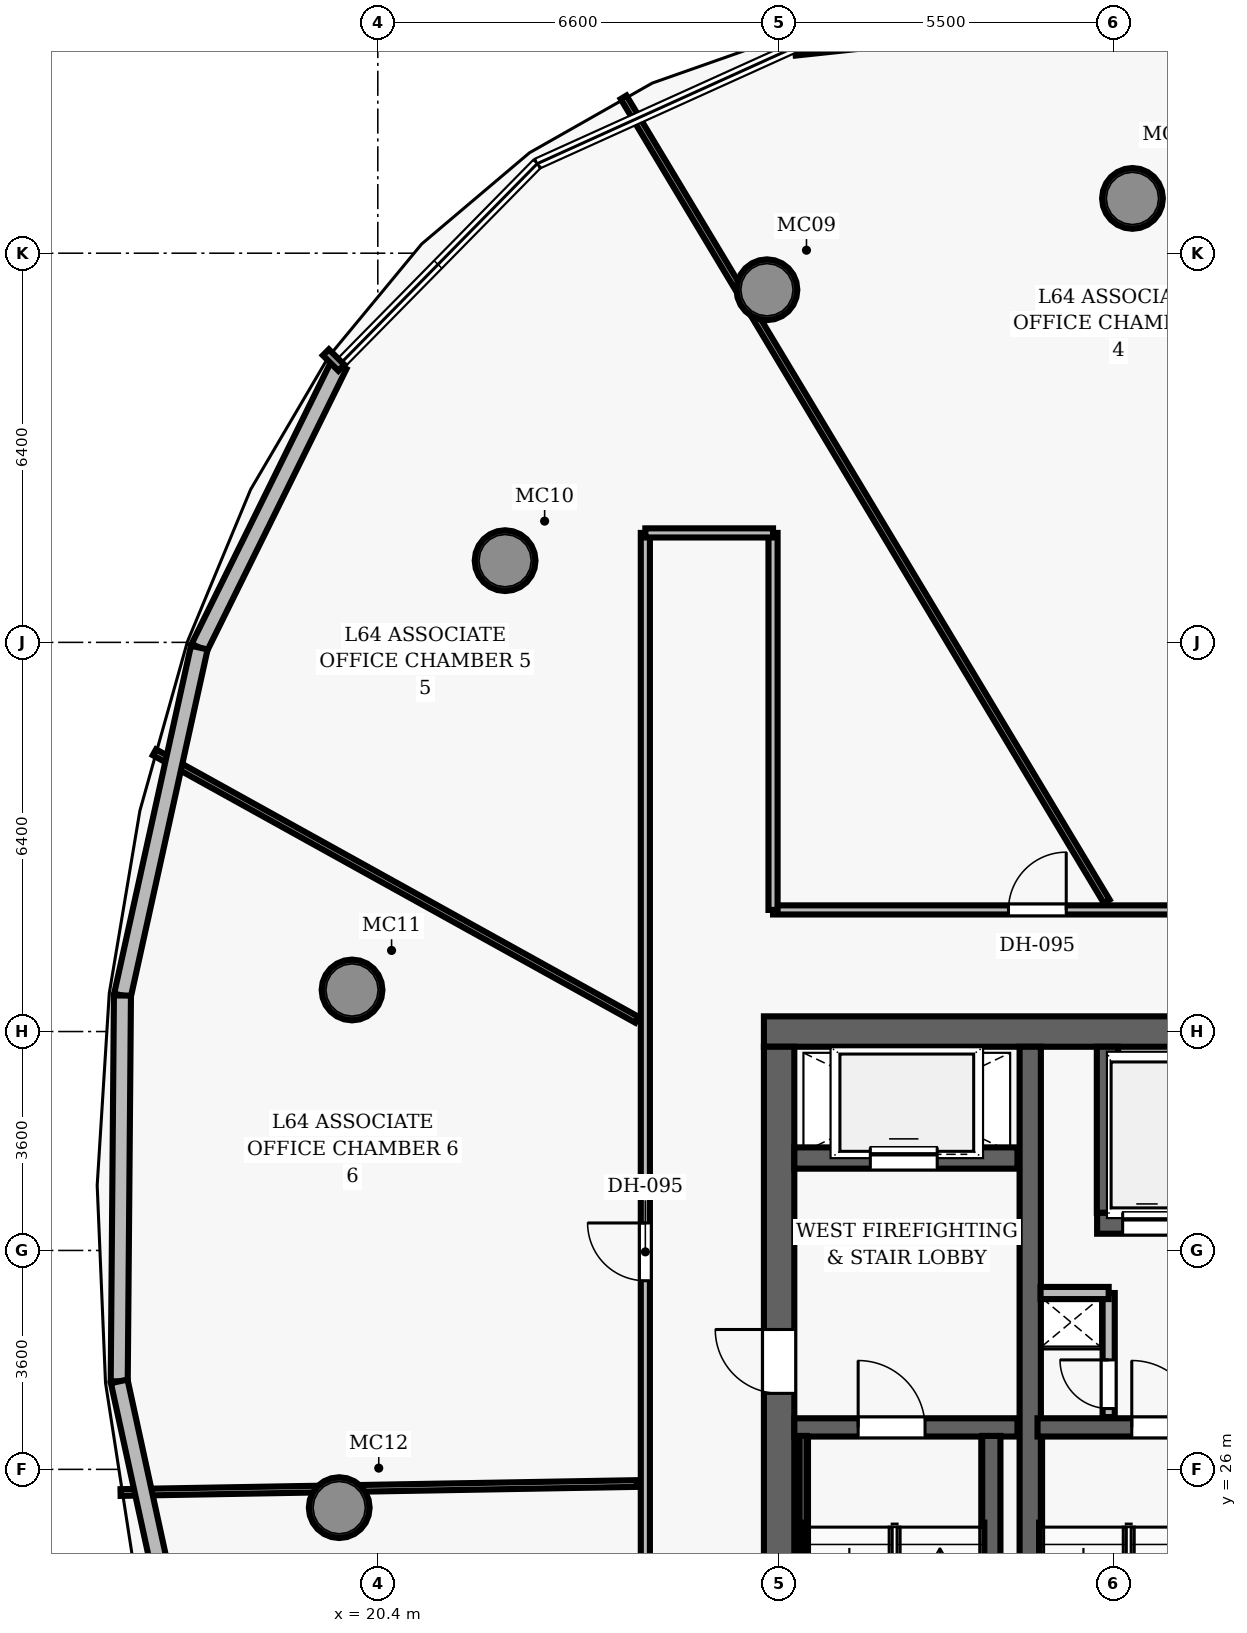
"""IFC4 building model, lengths in metres.
Left out: names, types, materials, properties, quantities, classifications, styles, units other than length and angle.
Written with IfcOpenShell. Run it as: python <this file> out.ifc"""

import sys

from ifc_helpers import new_model, si_unit, direction, frame, frame_2d, origin, origin_2d, place, context, subcontext, project, spatial, rectangle, hollow_circle, extrude, element, fill, save


model = new_model("IFC4")
c1 = context("Model", 3, precision=1e-05, world=origin(), true_north=direction((0.0, 1.0)))
c2 = subcontext(c1, "Body", "Model", "MODEL_VIEW")
j1 = project(units=[si_unit("LENGTHUNIT", "METRE"), si_unit("PLANEANGLEUNIT", "RADIAN")], contexts=[c1])
p1 = place(None, origin())
s1 = spatial("IfcSite", under=j1, at=p1, CompositionType="ELEMENT")
p2 = place(p1, origin())
s2 = spatial("IfcBuilding", under=s1, at=p2, CompositionType="ELEMENT")
p3 = place(p2, frame((0.0, 0.0, 253.6)))
s3 = spatial("IfcBuildingStorey", under=s2, at=p3, CompositionType="ELEMENT", Elevation=253.6)
p4 = place(p3, frame((26.75, 33.2, 0.0), z_axis=(0.0, 0.0, 1.0), x_axis=(1.0, 0.0, 0.0)))
e1 = element("IfcWall", 1, at=p4, inside=s3, PredefinedType="SHEAR", context=c2, shape_type="SweptSolid", body=[
    extrude(rectangle(XDim=22.5, YDim=0.5, at=frame_2d((11.25, 0.0))), origin(), (0.0, 0.0, 1.0), 3.85),
])
p5 = place(p3, frame((27.0, 19.05, 0.0), z_axis=(0.0, 0.0, 1.0), x_axis=(0.0, 1.0, 0.0)))
e2 = element("IfcWall", 2, at=p5, inside=s3, PredefinedType="SHEAR", context=c2, shape_type="SweptSolid", body=[
    extrude(rectangle(XDim=13.9, YDim=0.5, at=frame_2d((6.95, 0.0))), origin(), (0.0, 0.0, 1.0), 3.85),
])
p6 = place(p5, frame((8.2, 0.0, 0.0)))
e3 = element("IfcOpeningElement", 3, at=p6, cuts=e2, PredefinedType="OPENING", context=c2, shape_type="SweptSolid", body=[
    extrude(rectangle(XDim=1.05, YDim=2.15, at=frame_2d((0.525, 1.075))), frame((0.0, 0.26, 0.0), z_axis=(0.0, -1.0, 0.0), x_axis=(1.0, 0.0, 0.0)), (0.0, 0.0, 1.0), 0.52),
])
p7 = place(p3, frame((31.13, 19.05, 0.0), z_axis=(0.0, 0.0, 1.0), x_axis=(0.0, 1.0, 0.0)))
e4 = element("IfcWall", 4, at=p7, inside=s3, PredefinedType="SHEAR", context=c2, shape_type="SweptSolid", body=[
    extrude(rectangle(XDim=13.9, YDim=0.35, at=frame_2d((6.95, 0.0))), origin(), (0.0, 0.0, 1.0), 3.85),
])
for number, where, z_axis, x_axis in (
    (5, (32.812, 46.901, 0.0), (0.0, 0.0, 1.0), (1.0, 0.0, 0.0)),
    (6, (26.8, 45.399, 0.0), (0.0, 0.0, 1.0), (1.0, 0.0, 0.0)),
    (7, (22.494, 40.944, 0.0), (0.0, 0.0, 1.0), (1.0, 0.0, 0.0)),
    (8, (19.976, 33.884, 0.0), (0.0, 0.0, 1.0), (1.0, 0.0, 0.0)),
    (9, (19.765, 25.371, 0.0), (0.0, 0.0, 1.0), (1.0, 0.0, 0.0)),
):
    element("IfcColumn", number, at=place(p3, frame(where, z_axis=z_axis, x_axis=x_axis)), inside=s3, PredefinedType="COLUMN", context=c2, shape_type="SweptSolid", body=[
        extrude(hollow_circle(Radius=0.5, WallThickness=0.045, at=origin_2d()), origin(), (0.0, 0.0, 1.0), 3.85),
    ])
p8 = place(p3, frame((27.25, 26.69, 0.0), z_axis=(0.0, 0.0, 1.0), x_axis=(1.0, 0.0, 0.0)))
e10 = element("IfcWall", 10, at=p8, inside=s3, PredefinedType="SHEAR", context=c2, shape_type="SweptSolid", body=[
    extrude(rectangle(XDim=3.67, YDim=0.3, at=frame_2d((1.835, 0.0))), origin(), (0.0, 0.0, 1.0), 3.85),
])
p9 = place(p8, frame((1.05, 0.0, 0.0)))
e11 = element("IfcOpeningElement", 11, at=p9, cuts=e10, PredefinedType="OPENING", context=c2, shape_type="SweptSolid", body=[
    extrude(rectangle(XDim=1.1, YDim=2.15, at=frame_2d((0.55, 1.075))), frame((0.0, 0.16, 0.0), z_axis=(0.0, -1.0, 0.0), x_axis=(1.0, 0.0, 0.0)), (0.0, 0.0, 1.0), 0.32),
])
p10 = place(p3, frame((30.49, 19.05, 0.0), z_axis=(0.0, 0.0, 1.0), x_axis=(0.0, 1.0, 0.0)))
e12 = element("IfcWall", 12, at=p10, inside=s3, PredefinedType="SHEAR", context=c2, shape_type="SweptSolid", body=[
    extrude(rectangle(XDim=7.5, YDim=0.3, at=frame_2d((3.75, 0.0))), origin(), (0.0, 0.0, 1.0), 3.85),
])
p11 = place(p3, frame((27.395, 19.1, 0.0), z_axis=(0.0, 0.0, 1.0), x_axis=(0.0, 1.0, 0.0)))
e13 = element("IfcWall", 13, at=p11, inside=s3, PredefinedType="SHEAR", context=c2, shape_type="SweptSolid", body=[
    extrude(rectangle(XDim=7.45, YDim=0.12, at=frame_2d((3.725, 0.0))), origin(), (0.0, 0.0, 1.0), 3.85),
])
p12 = place(p3, frame((27.25, 31.12, 0.0), z_axis=(0.0, 0.0, 1.0), x_axis=(1.0, 0.0, 0.0)))
e14 = element("IfcWall", 14, at=p12, inside=s3, PredefinedType="SHEAR", context=c2, shape_type="SweptSolid", body=[
    extrude(rectangle(XDim=3.67, YDim=0.35, at=frame_2d((1.835, 0.0))), origin(), (0.0, 0.0, 1.0), 3.04),
])
p13 = place(p12, frame((1.25, 0.0, 0.0)))
e15 = element("IfcOpeningElement", 15, at=p13, cuts=e14, PredefinedType="OPENING", context=c2, shape_type="SweptSolid", body=[
    extrude(rectangle(XDim=1.1, YDim=2.15, at=frame_2d((0.55, 1.075))), frame((0.0, 0.185, 0.0), z_axis=(0.0, -1.0, 0.0), x_axis=(1.0, 0.0, 0.0)), (0.0, 0.0, 1.0), 0.37),
])
p14 = place(p3, frame((31.25, 26.69, 0.0), z_axis=(0.0, 0.0, 1.0), x_axis=(1.0, 0.0, 0.0)))
e16 = element("IfcWall", 16, at=p14, inside=s3, PredefinedType="SHEAR", context=c2, shape_type="SweptSolid", body=[
    extrude(rectangle(XDim=3.56, YDim=0.3, at=frame_2d((1.78, 0.0))), origin(), (0.0, 0.0, 1.0), 3.85),
])
p15 = place(p14, frame((1.55, 0.0, 0.0)))
e17 = element("IfcOpeningElement", 17, at=p15, cuts=e16, PredefinedType="OPENING", context=c2, shape_type="SweptSolid", body=[
    extrude(rectangle(XDim=1.1, YDim=2.15, at=frame_2d((0.55, 1.075))), frame((0.0, 0.16, 0.0), z_axis=(0.0, -1.0, 0.0), x_axis=(1.0, 0.0, 0.0)), (0.0, 0.0, 1.0), 0.32),
])
p16 = place(p3, frame((32.23, 30.05, 0.0), z_axis=(0.0, 0.0, 1.0), x_axis=(1.0, 0.0, 0.0)))
e18 = element("IfcWall", 18, at=p16, inside=s3, PredefinedType="SHEAR", context=c2, shape_type="SweptSolid", body=[
    extrude(rectangle(XDim=2.41, YDim=0.35, at=frame_2d((1.205, 0.0))), origin(), (0.0, 0.0, 1.0), 3.04),
])
p17 = place(p16, frame((0.42, 0.0, 0.0)))
e19 = element("IfcOpeningElement", 19, at=p17, cuts=e18, PredefinedType="OPENING", context=c2, shape_type="SweptSolid", body=[
    extrude(rectangle(XDim=0.8, YDim=2.15, at=frame_2d((0.4, 1.075))), frame((0.0, 0.185, 0.0), z_axis=(0.0, -1.0, 0.0), x_axis=(1.0, 0.0, 0.0)), (0.0, 0.0, 1.0), 0.37),
])
p18 = place(p16, frame((1.42, 0.0, 0.0)))
e20 = element("IfcOpeningElement", 20, at=p18, cuts=e18, PredefinedType="OPENING", context=c2, shape_type="SweptSolid", body=[
    extrude(rectangle(XDim=0.8, YDim=2.15, at=frame_2d((0.4, 1.075))), frame((0.0, 0.185, 0.0), z_axis=(0.0, -1.0, 0.0), x_axis=(1.0, 0.0, 0.0)), (0.0, 0.0, 1.0), 0.37),
])
p19 = place(p3, frame((32.4, 30.22, 0.0), z_axis=(0.0, 0.0, 1.0), x_axis=(0.0, 1.0, 0.0)))
e21 = element("IfcWall", 21, at=p19, inside=s3, PredefinedType="SHEAR", context=c2, shape_type="SweptSolid", body=[
    extrude(rectangle(XDim=2.73, YDim=0.35, at=frame_2d((1.365, 0.0))), origin(), (0.0, 0.0, 1.0), 3.04),
])
p20 = place(p3, frame((32.42, 26.86, 0.0), z_axis=(0.0, 0.0, 1.0), x_axis=(0.0, 1.0, 0.0)))
e22 = element("IfcWall", 22, at=p20, inside=s3, PredefinedType="PARTITIONING", context=c2, shape_type="SweptSolid", body=[
    extrude(rectangle(XDim=2.04, YDim=0.2, at=frame_2d((1.02, 0.0))), origin(), (0.0, 0.0, 1.0), 3.04),
])
p21 = place(p20, frame((0.14, 0.0, 0.0)))
e23 = element("IfcOpeningElement", 23, at=p21, cuts=e22, PredefinedType="OPENING", context=c2, shape_type="SweptSolid", body=[
    extrude(rectangle(XDim=0.8, YDim=2.05, at=frame_2d((0.4, 1.025))), frame((0.0, 0.11, 0.0), z_axis=(0.0, -1.0, 0.0), x_axis=(1.0, 0.0, 0.0)), (0.0, 0.0, 1.0), 0.22),
])
p22 = place(p3, frame((31.3, 28.9, 0.0), z_axis=(0.0, 0.0, 1.0), x_axis=(1.0, 0.0, 0.0)))
e24 = element("IfcWall", 24, at=p22, inside=s3, PredefinedType="PARTITIONING", context=c2, shape_type="SweptSolid", body=[
    extrude(rectangle(XDim=1.12, YDim=0.2, at=frame_2d((0.56, 0.0))), origin(), (0.0, 0.0, 1.0), 3.04),
])
p23 = place(p3, frame((26.9, 35.2, 0.0), z_axis=(0.0, 0.0, 1.0), x_axis=(1.0, 0.0, 0.0)))
e25 = element("IfcWall", 25, at=p23, inside=s3, PredefinedType="PARTITIONING", context=c2, shape_type="SweptSolid", body=[
    extrude(rectangle(XDim=10.05, YDim=0.15, at=frame_2d((5.025, 0.0))), origin(), (0.0, 0.0, 1.0), 3.04),
])
p24 = place(p23, frame((7.149, 0.0, 0.0)))
e26 = element("IfcOpeningElement", 26, at=p24, cuts=e25, PredefinedType="OPENING", context=c2, shape_type="SweptSolid", body=[
    extrude(rectangle(XDim=0.95, YDim=2.15, at=frame_2d((0.475, 1.075))), frame((0.0, 0.085, 0.0), z_axis=(0.0, -1.0, 0.0), x_axis=(1.0, 0.0, 0.0)), (0.0, 0.0, 1.0), 0.17),
])
p25 = place(p23, frame((3.872, 0.0, 0.0)))
e27 = element("IfcOpeningElement", 27, at=p25, cuts=e25, PredefinedType="OPENING", context=c2, shape_type="SweptSolid", body=[
    extrude(rectangle(XDim=0.95, YDim=2.15, at=frame_2d((0.475, 1.075))), frame((0.0, 0.085, 0.0), z_axis=(0.0, -1.0, 0.0), x_axis=(1.0, 0.0, 0.0)), (0.0, 0.0, 1.0), 0.17),
])
p26 = place(p3, frame((24.8, 11.317, 0.0), z_axis=(0.0, 0.0, 1.0), x_axis=(0.0, 1.0, 0.0)))
e28 = element("IfcWall", 28, at=p26, inside=s3, PredefinedType="PARTITIONING", context=c2, shape_type="SweptSolid", body=[
    extrude(rectangle(XDim=30.083, YDim=0.15, at=frame_2d((15.042, 0.0))), origin(), (0.0, 0.0, 1.0), 3.04),
])
p27 = place(p26, frame((17.785, 0.0, 0.0)))
e29 = element("IfcOpeningElement", 29, at=p27, cuts=e28, PredefinedType="OPENING", context=c2, shape_type="SweptSolid", body=[
    extrude(rectangle(XDim=0.95, YDim=2.15, at=frame_2d((0.475, 1.075))), frame((0.0, 0.085, 0.0), z_axis=(0.0, -1.0, 0.0), x_axis=(1.0, 0.0, 0.0)), (0.0, 0.0, 1.0), 0.17),
])
p28 = place(p26, frame((11.343, 0.0, 0.0)))
e30 = element("IfcOpeningElement", 30, at=p28, cuts=e28, PredefinedType="OPENING", context=c2, shape_type="SweptSolid", body=[
    extrude(rectangle(XDim=0.95, YDim=2.15, at=frame_2d((0.475, 1.075))), frame((0.0, 0.085, 0.0), z_axis=(0.0, -1.0, 0.0), x_axis=(1.0, 0.0, 0.0)), (0.0, 0.0, 1.0), 0.17),
])
p29 = place(p3, frame((26.9, 35.2, 0.0), z_axis=(0.0, 0.0, 1.0), x_axis=(0.0, 1.0, 0.0)))
e31 = element("IfcWall", 31, at=p29, inside=s3, PredefinedType="PARTITIONING", context=c2, shape_type="SweptSolid", body=[
    extrude(rectangle(XDim=6.2, YDim=0.15, at=frame_2d((3.1, 0.0))), origin(), (0.0, 0.0, 1.0), 3.04),
])
p30 = place(p3, frame((24.8, 41.4, 0.0), z_axis=(0.0, 0.0, 1.0), x_axis=(1.0, 0.0, 0.0)))
e32 = element("IfcWall", 32, at=p30, inside=s3, PredefinedType="PARTITIONING", context=c2, shape_type="SweptSolid", body=[
    extrude(rectangle(XDim=2.1, YDim=0.15, at=frame_2d((1.05, 0.0))), origin(), (0.0, 0.0, 1.0), 3.04),
])
p31 = place(p3, frame((32.388, 35.34, 0.0), z_axis=(0.0, 0.0, 1.0), x_axis=(-0.515035560083, 0.857168811758, 0.0)))
e33 = element("IfcWall", 33, at=p31, inside=s3, PredefinedType="PARTITIONING", context=c2, shape_type="SweptSolid", body=[
    extrude(rectangle(XDim=15.428, YDim=0.11, at=frame_2d((7.714, 0.0))), origin(), (0.0, 0.0, 1.0), 3.04),
])
p32 = place(p3, frame((24.66, 33.395, 0.0), z_axis=(0.0, 0.0, 1.0), x_axis=(-0.874629144462, 0.484792594475, 0.0)))
e34 = element("IfcWall", 34, at=p32, inside=s3, PredefinedType="PARTITIONING", context=c2, shape_type="SweptSolid", body=[
    extrude(rectangle(XDim=9.071, YDim=0.11, at=frame_2d((4.535, 0.0))), origin(), (0.0, 0.0, 1.0), 3.04),
])
p33 = place(p3, frame((24.66, 25.767, 0.0), z_axis=(0.0, 0.0, 1.0), x_axis=(-0.999847721367, -0.017450904792, 0.0)))
e35 = element("IfcWall", 35, at=p33, inside=s3, PredefinedType="PARTITIONING", context=c2, shape_type="SweptSolid", body=[
    extrude(rectangle(XDim=8.492, YDim=0.11, at=frame_2d((4.246, 0.0))), origin(), (0.0, 0.0, 1.0), 3.04),
])
p34 = place(p3, frame((32.408, 49.939, 0.0), z_axis=(0.0, 0.0, 1.0), x_axis=(0.990881813427, -0.134733929727, 0.0)))
e36 = element("IfcWall", 36, at=p34, inside=s3, PredefinedType="SOLIDWALL", context=c2, shape_type="SweptSolid", body=[
    extrude(rectangle(XDim=5.86, YDim=0.28, at=frame_2d((2.93, 0.0))), origin(), (0.0, 0.0, 1.0), 3.625),
])
for number, where, z_axis, x_axis in (
    (37, (27.258, 49.389, 0.0), (0.0, 0.0, 1.0), (0.994, 0.106, 0.0)),
    (38, (17.464, 39.514, 0.0), (0.0, 0.0, 1.0), (0.443, 0.897, 0.0)),
):
    element("IfcWall", number, at=place(p3, frame(where, z_axis=z_axis, x_axis=x_axis)), inside=s3, PredefinedType="SOLIDWALL", context=c2, shape_type="SweptSolid", body=[
        extrude(rectangle(XDim=5.179, YDim=0.28, at=frame_2d((2.59, 0.0))), origin(), (0.0, 0.0, 1.0), 3.625),
    ])
p35 = place(p3, frame((16.2, 33.792, 0.0), z_axis=(0.0, 0.0, 1.0), x_axis=(0.215681903997, 0.97646367894, 0.0)))
e39 = element("IfcWall", 39, at=p35, inside=s3, PredefinedType="SOLIDWALL", context=c2, shape_type="SweptSolid", body=[
    extrude(rectangle(XDim=5.86, YDim=0.28, at=frame_2d((2.93, 0.0))), origin(), (0.0, 0.0, 1.0), 3.625),
])
p36 = place(p3, frame((16.147, 27.447, 0.0), z_axis=(0.0, 0.0, 1.0), x_axis=(0.008349395362, 0.999965143191, 0.0)))
e40 = element("IfcWall", 40, at=p36, inside=s3, PredefinedType="SOLIDWALL", context=c2, shape_type="SweptSolid", body=[
    extrude(rectangle(XDim=6.345, YDim=0.28, at=frame_2d((3.173, 0.0))), origin(), (0.0, 0.0, 1.0), 3.625),
])
p37 = place(p3, frame((17.537, 21.071, 0.0), z_axis=(0.0, 0.0, 1.0), x_axis=(-0.21290021568, 0.977073947132, 0.0)))
e41 = element("IfcWall", 41, at=p37, inside=s3, PredefinedType="SOLIDWALL", context=c2, shape_type="SweptSolid", body=[
    extrude(rectangle(XDim=6.526, YDim=0.28, at=frame_2d((3.263, 0.0))), origin(), (0.0, 0.0, 1.0), 3.625),
])
p38 = place(p9, origin())
e42 = element("IfcDoor", 42, at=p38, inside=s3, OperationType="SINGLE_SWING_LEFT", PredefinedType="DOOR", context=c2, shape_type="SweptSolid", body=[
    extrude(rectangle(XDim=1.1, YDim=2.15, at=frame_2d((0.55, 1.075))), frame((0.0, 0.025, 0.0), z_axis=(0.0, -1.0, 0.0), x_axis=(1.0, 0.0, 0.0)), (0.0, 0.0, 1.0), 0.05),
])
fill(e11, e42)
p39 = place(p6, origin())
e43 = element("IfcDoor", 43, at=p39, inside=s3, OperationType="SINGLE_SWING_RIGHT", PredefinedType="DOOR", context=c2, shape_type="SweptSolid", body=[
    extrude(rectangle(XDim=1.05, YDim=2.15, at=frame_2d((0.525, 1.075))), frame((0.0, 0.025, 0.0), z_axis=(0.0, -1.0, 0.0), x_axis=(1.0, 0.0, 0.0)), (0.0, 0.0, 1.0), 0.05),
])
fill(e3, e43)
p40 = place(p15, origin())
e44 = element("IfcDoor", 44, at=p40, inside=s3, OperationType="SINGLE_SWING_LEFT", PredefinedType="DOOR", context=c2, shape_type="SweptSolid", body=[
    extrude(rectangle(XDim=1.1, YDim=2.15, at=frame_2d((0.55, 1.075))), frame((0.0, 0.025, 0.0), z_axis=(0.0, -1.0, 0.0), x_axis=(1.0, 0.0, 0.0)), (0.0, 0.0, 1.0), 0.05),
])
fill(e17, e44)
p41 = place(p21, origin())
e45 = element("IfcDoor", 45, at=p41, inside=s3, OperationType="SINGLE_SWING_RIGHT", PredefinedType="DOOR", context=c2, shape_type="SweptSolid", body=[
    extrude(rectangle(XDim=0.8, YDim=2.05, at=frame_2d((0.4, 1.025))), frame((0.0, 0.025, 0.0), z_axis=(0.0, -1.0, 0.0), x_axis=(1.0, 0.0, 0.0)), (0.0, 0.0, 1.0), 0.05),
])
fill(e23, e45)
p42 = place(p25, origin())
e46 = element("IfcDoor", 46, at=p42, inside=s3, OperationType="SINGLE_SWING_RIGHT", PredefinedType="DOOR", context=c2, shape_type="SweptSolid", body=[
    extrude(rectangle(XDim=0.95, YDim=2.15, at=frame_2d((0.475, 1.075))), frame((0.0, 0.025, 0.0), z_axis=(0.0, -1.0, 0.0), x_axis=(1.0, 0.0, 0.0)), (0.0, 0.0, 1.0), 0.05),
])
fill(e27, e46)
p43 = place(p27, origin())
e47 = element("IfcDoor", 47, at=p43, inside=s3, OperationType="SINGLE_SWING_RIGHT", PredefinedType="DOOR", context=c2, shape_type="SweptSolid", body=[
    extrude(rectangle(XDim=0.95, YDim=2.15, at=frame_2d((0.475, 1.075))), frame((0.0, 0.025, 0.0), z_axis=(0.0, -1.0, 0.0), x_axis=(1.0, 0.0, 0.0)), (0.0, 0.0, 1.0), 0.05),
])
fill(e29, e47)
p44 = place(p13, origin())
e48 = element("IfcDoor", 48, at=p44, inside=s3, OperationType="SLIDING_TO_LEFT", PredefinedType="DOOR", context=c2, shape_type="SweptSolid", body=[
    extrude(rectangle(XDim=1.1, YDim=2.15, at=frame_2d((0.55, 1.075))), frame((0.0, 0.025, 0.0), z_axis=(0.0, -1.0, 0.0), x_axis=(1.0, 0.0, 0.0)), (0.0, 0.0, 1.0), 0.05),
])
fill(e15, e48)
p45 = place(p17, origin())
e49 = element("IfcDoor", 49, at=p45, inside=s3, OperationType="SLIDING_TO_LEFT", PredefinedType="DOOR", context=c2, shape_type="SweptSolid", body=[
    extrude(rectangle(XDim=0.8, YDim=2.15, at=frame_2d((0.4, 1.075))), frame((0.0, 0.025, 0.0), z_axis=(0.0, -1.0, 0.0), x_axis=(1.0, 0.0, 0.0)), (0.0, 0.0, 1.0), 0.05),
])
fill(e19, e49)
save(model, sys.argv[1])
